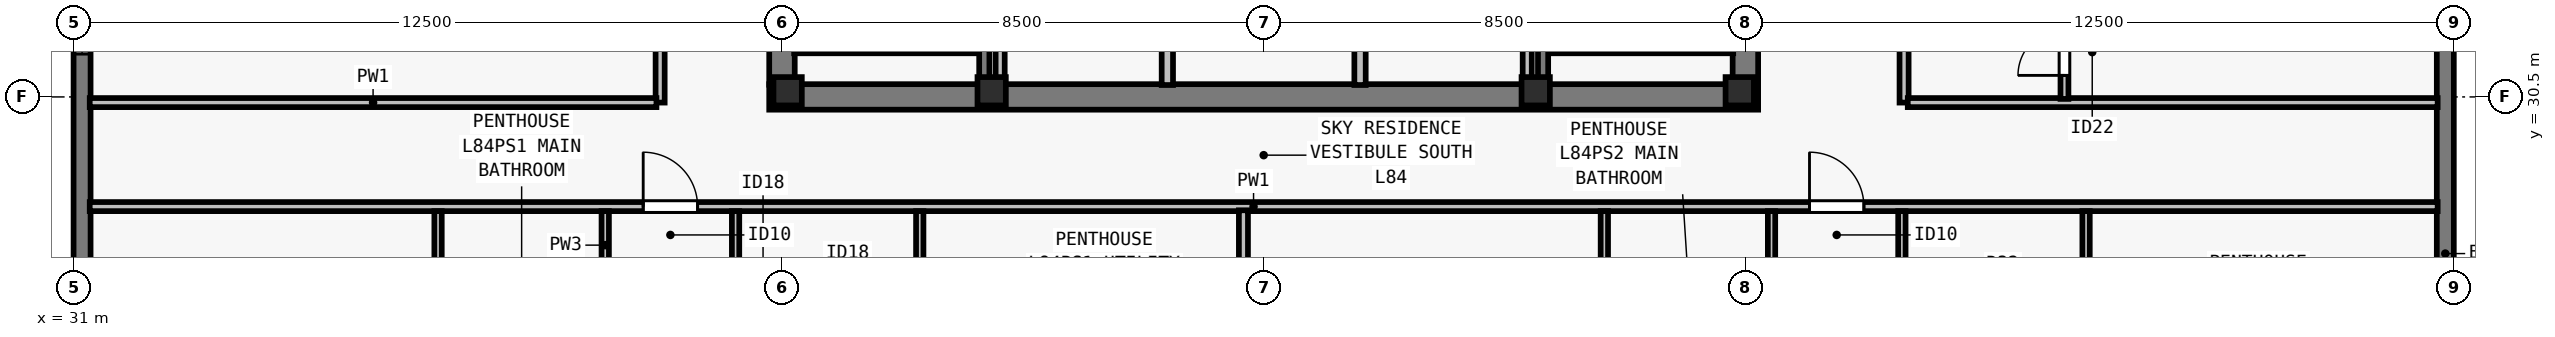
"""IFC4 building model, lengths in metres.
Left out: names, types, materials, properties, quantities, classifications, styles, units other than length and angle.
Written with IfcOpenShell. Run it as: python <this file> out.ifc"""

import sys

from ifc_helpers import new_model, si_unit, direction, frame, frame_2d, origin, origin_2d, place, context, subcontext, project, spatial, rectangle, i_section, extrude, element, fill, save


model = new_model("IFC4")
c1 = context("Model", 3, precision=1e-05, world=origin(), true_north=direction((0.0, 1.0)))
c2 = subcontext(c1, "Body", "Model", "MODEL_VIEW")
j1 = project(units=[si_unit("LENGTHUNIT", "METRE"), si_unit("PLANEANGLEUNIT", "RADIAN")], contexts=[c1])
p1 = place(None, origin())
s1 = spatial("IfcSite", under=j1, at=p1, CompositionType="ELEMENT")
p2 = place(p1, origin())
s2 = spatial("IfcBuilding", under=s1, at=p2, CompositionType="ELEMENT")
p3 = place(p2, frame((0.0, 0.0, 305.0)))
s3 = spatial("IfcBuildingStorey", under=s2, at=p3, CompositionType="ELEMENT", Elevation=305.0)
for number, where, z_axis, x_axis in (
    (1, (43.6, 30.6, 0.0), (0.0, 0.0, 1.0), (1.0, 0.0, 0.0)),
    (2, (47.2, 30.6, 0.0), (0.0, 0.0, 1.0), (1.0, 0.0, 0.0)),
    (3, (56.8, 30.6, 0.0), (0.0, 0.0, 1.0), (1.0, 0.0, 0.0)),
    (4, (60.4, 30.6, 0.0), (0.0, 0.0, 1.0), (1.0, 0.0, 0.0)),
):
    element("IfcColumn", number, at=place(p3, frame(where, z_axis=z_axis, x_axis=x_axis)), inside=s3, PredefinedType="COLUMN", context=c2, shape_type="SweptSolid", body=[
        extrude(i_section(OverallWidth=0.5, OverallDepth=0.5, WebThickness=0.028, FlangeThickness=0.045, at=origin_2d()), origin(), (0.0, 0.0, 1.0), 3.5),
    ])
p4 = place(p3, frame((72.85, 35.6, 0.0), z_axis=(0.0, 0.0, 1.0), x_axis=(0.0, -1.0, 0.0)))
e5 = element("IfcWall", 5, at=p4, inside=s3, PredefinedType="SOLIDWALL", context=c2, shape_type="SweptSolid", body=[
    extrude(rectangle(XDim=11.822, YDim=0.3, at=frame_2d((5.911, 0.0))), origin(), (0.0, 0.0, 1.0), 3.29),
])
p5 = place(p4, frame((2.105, 0.0, 0.8)))
e6 = element("IfcOpeningElement", 6, at=p5, cuts=e5, PredefinedType="OPENING", context=c2, shape_type="SweptSolid", body=[
    extrude(rectangle(XDim=1.65, YDim=1.758, at=frame_2d((0.825, 0.879))), frame((0.0, 0.16, 0.0), z_axis=(0.0, -1.0, 0.0), x_axis=(1.0, 0.0, 0.0)), (0.0, 0.0, 1.0), 0.32),
])
p6 = place(p3, frame((31.15, 23.5, 0.0), z_axis=(0.0, 0.0, 1.0), x_axis=(0.0, 1.0, 0.0)))
e7 = element("IfcWall", 7, at=p6, inside=s3, PredefinedType="SOLIDWALL", context=c2, shape_type="SweptSolid", body=[
    extrude(rectangle(XDim=30.722, YDim=0.3, at=frame_2d((15.361, 0.0))), origin(), (0.0, 0.0, 1.0), 3.29),
])
p7 = place(p6, frame((7.756, 0.0, 0.8)))
e8 = element("IfcOpeningElement", 8, at=p7, cuts=e7, PredefinedType="OPENING", context=c2, shape_type="SweptSolid", body=[
    extrude(rectangle(XDim=2.0, YDim=1.758, at=frame_2d((1.0, 0.879))), frame((0.0, 0.16, 0.0), z_axis=(0.0, -1.0, 0.0), x_axis=(1.0, 0.0, 0.0)), (0.0, 0.0, 1.0), 0.32),
])
p8 = place(p6, frame((12.617, 0.0, 0.8)))
e9 = element("IfcOpeningElement", 9, at=p8, cuts=e7, PredefinedType="OPENING", context=c2, shape_type="SweptSolid", body=[
    extrude(rectangle(XDim=1.65, YDim=1.758, at=frame_2d((0.825, 0.879))), frame((0.0, 0.16, 0.0), z_axis=(0.0, -1.0, 0.0), x_axis=(1.0, 0.0, 0.0)), (0.0, 0.0, 1.0), 0.32),
])
p9 = place(p6, frame((16.28, 0.0, 0.8)))
e10 = element("IfcOpeningElement", 10, at=p9, cuts=e7, PredefinedType="OPENING", context=c2, shape_type="SweptSolid", body=[
    extrude(rectangle(XDim=2.0, YDim=1.758, at=frame_2d((1.0, 0.879))), frame((0.0, 0.16, 0.0), z_axis=(0.0, -1.0, 0.0), x_axis=(1.0, 0.0, 0.0)), (0.0, 0.0, 1.0), 0.32),
])
p10 = place(p6, frame((21.142, 0.0, 0.8)))
e11 = element("IfcOpeningElement", 11, at=p10, cuts=e7, PredefinedType="OPENING", context=c2, shape_type="SweptSolid", body=[
    extrude(rectangle(XDim=1.65, YDim=1.758, at=frame_2d((0.825, 0.879))), frame((0.0, 0.16, 0.0), z_axis=(0.0, -1.0, 0.0), x_axis=(1.0, 0.0, 0.0)), (0.0, 0.0, 1.0), 0.32),
])
p11 = place(p3, frame((43.275, 30.5, 0.0), z_axis=(0.0, 0.0, 1.0), x_axis=(1.0, 0.0, 0.0)))
e12 = element("IfcWall", 12, at=p11, inside=s3, PredefinedType="SHEAR", context=c2, shape_type="SweptSolid", body=[
    extrude(rectangle(XDim=17.45, YDim=0.45, at=frame_2d((8.725, 0.0))), origin(), (0.0, 0.0, 1.0), 3.29),
])
for number, where, z_axis, x_axis in (
    (13, (43.5, 30.715, 0.0), (0.0, 0.0, 1.0), (0.0, 1.0, 0.0)),
    (14, (60.5, 30.715, 0.0), (0.0, 0.0, 1.0), (0.0, 1.0, 0.0)),
):
    element("IfcWall", number, at=place(p3, frame(where, z_axis=z_axis, x_axis=x_axis)), inside=s3, PredefinedType="SHEAR", context=c2, shape_type="SweptSolid", body=[
        extrude(rectangle(XDim=8.035, YDim=0.45, at=frame_2d((4.018, 0.0))), origin(), (0.0, 0.0, 1.0), 3.29),
    ])
p12 = place(p3, frame((50.3, 30.71, 0.0), z_axis=(0.0, 0.0, 1.0), x_axis=(0.0, 1.0, 0.0)))
e15 = element("IfcWall", 15, at=p12, inside=s3, PredefinedType="SOLIDWALL", context=c2, shape_type="SweptSolid", body=[
    extrude(rectangle(XDim=7.905, YDim=0.2, at=frame_2d((3.953, 0.0))), origin(), (0.0, 0.0, 1.0), 3.29),
])
p13 = place(p12, frame((3.34, 0.0, 0.0)))
e16 = element("IfcOpeningElement", 16, at=p13, cuts=e15, PredefinedType="OPENING", context=c2, shape_type="SweptSolid", body=[
    extrude(rectangle(XDim=0.9, YDim=2.12, at=frame_2d((0.45, 1.06))), frame((0.0, 0.11, 0.0), z_axis=(0.0, -1.0, 0.0), x_axis=(1.0, 0.0, 0.0)), (0.0, 0.0, 1.0), 0.22),
])
p14 = place(p3, frame((53.7, 30.71, 0.0), z_axis=(0.0, 0.0, 1.0), x_axis=(0.0, 1.0, 0.0)))
e17 = element("IfcWall", 17, at=p14, inside=s3, PredefinedType="SOLIDWALL", context=c2, shape_type="SweptSolid", body=[
    extrude(rectangle(XDim=7.905, YDim=0.2, at=frame_2d((3.953, 0.0))), origin(), (0.0, 0.0, 1.0), 3.29),
])
p15 = place(p14, frame((1.39, 0.0, 0.0)))
e18 = element("IfcOpeningElement", 18, at=p15, cuts=e17, PredefinedType="OPENING", context=c2, shape_type="SweptSolid", body=[
    extrude(rectangle(XDim=0.95, YDim=2.12, at=frame_2d((0.475, 1.06))), frame((0.0, 0.11, 0.0), z_axis=(0.0, -1.0, 0.0), x_axis=(1.0, 0.0, 0.0)), (0.0, 0.0, 1.0), 0.22),
])
p16 = place(p14, frame((5.39, 0.0, 0.0)))
e19 = element("IfcOpeningElement", 19, at=p16, cuts=e17, PredefinedType="OPENING", context=c2, shape_type="SweptSolid", body=[
    extrude(rectangle(XDim=0.85, YDim=2.12, at=frame_2d((0.425, 1.06))), frame((0.0, 0.11, 0.0), z_axis=(0.0, -1.0, 0.0), x_axis=(1.0, 0.0, 0.0)), (0.0, 0.0, 1.0), 0.22),
])
for number, where, z_axis, x_axis in (
    (20, (47.35, 30.71, 0.0), (0.0, 0.0, 1.0), (0.0, 1.0, 0.0)),
    (21, (56.65, 30.71, 0.0), (0.0, 0.0, 1.0), (0.0, 1.0, 0.0)),
):
    element("IfcWall", number, at=place(p3, frame(where, z_axis=z_axis, x_axis=x_axis)), inside=s3, PredefinedType="PARTITIONING", context=c2, shape_type="SweptSolid", body=[
        extrude(rectangle(XDim=7.905, YDim=0.16, at=frame_2d((3.953, 0.0))), origin(), (0.0, 0.0, 1.0), 3.29),
    ])
p17 = place(p3, frame((31.285, 28.565, 0.0), z_axis=(0.0, 0.0, 1.0), x_axis=(1.0, 0.0, 0.0)))
e22 = element("IfcWall", 22, at=p17, inside=s3, PredefinedType="PARTITIONING", context=c2, shape_type="SweptSolid", body=[
    extrude(rectangle(XDim=41.43, YDim=0.16, at=frame_2d((20.715, 0.0))), origin(), (0.0, 0.0, 1.0), 3.009),
])
p18 = place(p17, frame((9.766, 0.0, 0.0)))
e23 = element("IfcOpeningElement", 23, at=p18, cuts=e22, PredefinedType="OPENING", context=c2, shape_type="SweptSolid", body=[
    extrude(rectangle(XDim=0.96, YDim=2.18, at=frame_2d((0.48, 1.09))), frame((0.0, 0.09, 0.0), z_axis=(0.0, -1.0, 0.0), x_axis=(1.0, 0.0, 0.0)), (0.0, 0.0, 1.0), 0.18),
])
p19 = place(p17, frame((30.346, 0.0, 0.0)))
e24 = element("IfcOpeningElement", 24, at=p19, cuts=e22, PredefinedType="OPENING", context=c2, shape_type="SweptSolid", body=[
    extrude(rectangle(XDim=0.96, YDim=2.18, at=frame_2d((0.48, 1.09))), frame((0.0, 0.09, 0.0), z_axis=(0.0, -1.0, 0.0), x_axis=(1.0, 0.0, 0.0)), (0.0, 0.0, 1.0), 0.18),
])
p20 = place(p3, frame((41.35, 30.4, 0.0), z_axis=(0.0, 0.0, 1.0), x_axis=(0.0, 1.0, 0.0)))
e25 = element("IfcWall", 25, at=p20, inside=s3, PredefinedType="PARTITIONING", context=c2, shape_type="SweptSolid", body=[
    extrude(rectangle(XDim=17.2, YDim=0.16, at=frame_2d((8.6, 0.0))), origin(), (0.0, 0.0, 1.0), 3.009),
])
p21 = place(p20, frame((8.0, 0.0, 0.0)))
e26 = element("IfcOpeningElement", 26, at=p21, cuts=e25, PredefinedType="OPENING", context=c2, shape_type="SweptSolid", body=[
    extrude(rectangle(XDim=0.96, YDim=2.12, at=frame_2d((0.48, 1.06))), frame((0.0, 0.09, 0.0), z_axis=(0.0, -1.0, 0.0), x_axis=(1.0, 0.0, 0.0)), (0.0, 0.0, 1.0), 0.18),
])
p22 = place(p3, frame((63.3, 30.4, 0.0), z_axis=(0.0, 0.0, 1.0), x_axis=(0.0, 1.0, 0.0)))
e27 = element("IfcWall", 27, at=p22, inside=s3, PredefinedType="PARTITIONING", context=c2, shape_type="SweptSolid", body=[
    extrude(rectangle(XDim=17.2, YDim=0.16, at=frame_2d((8.6, 0.0))), origin(), (0.0, 0.0, 1.0), 3.29),
])
p23 = place(p22, frame((8.12, 0.0, 0.0)))
e28 = element("IfcOpeningElement", 28, at=p23, cuts=e27, PredefinedType="OPENING", context=c2, shape_type="SweptSolid", body=[
    extrude(rectangle(XDim=0.96, YDim=2.18, at=frame_2d((0.48, 1.09))), frame((0.0, 0.09, 0.0), z_axis=(0.0, -1.0, 0.0), x_axis=(1.0, 0.0, 0.0)), (0.0, 0.0, 1.0), 0.18),
])
p24 = place(p3, frame((31.285, 30.4, 0.0), z_axis=(0.0, 0.0, 1.0), x_axis=(1.0, 0.0, 0.0)))
e29 = element("IfcWall", 29, at=p24, inside=s3, PredefinedType="PARTITIONING", context=c2, shape_type="SweptSolid", body=[
    extrude(rectangle(XDim=10.0, YDim=0.16, at=frame_2d((5.0, 0.0))), origin(), (0.0, 0.0, 1.0), 3.29),
])
p25 = place(p3, frame((63.365, 30.4, 0.0), z_axis=(0.0, 0.0, 1.0), x_axis=(1.0, 0.0, 0.0)))
e30 = element("IfcWall", 30, at=p25, inside=s3, PredefinedType="PARTITIONING", context=c2, shape_type="SweptSolid", body=[
    extrude(rectangle(XDim=9.35, YDim=0.16, at=frame_2d((4.675, 0.0))), origin(), (0.0, 0.0, 1.0), 3.29),
])
p26 = place(p3, frame((37.431, 25.735, 0.0), z_axis=(0.0, 0.0, 1.0), x_axis=(0.0, 1.0, 0.0)))
e31 = element("IfcWall", 31, at=p26, inside=s3, PredefinedType="PLUMBINGWALL", context=c2, shape_type="SweptSolid", body=[
    extrude(rectangle(XDim=2.75, YDim=0.13, at=frame_2d((1.375, 0.0))), origin(), (0.0, 0.0, 1.0), 3.29),
])
p27 = place(p3, frame((40.381, 25.735, 0.0), z_axis=(0.0, 0.0, 1.0), x_axis=(0.0, 1.0, 0.0)))
e32 = element("IfcWall", 32, at=p27, inside=s3, PredefinedType="PLUMBINGWALL", context=c2, shape_type="SweptSolid", body=[
    extrude(rectangle(XDim=2.75, YDim=0.13, at=frame_2d((1.375, 0.0))), origin(), (0.0, 0.0, 1.0), 3.29),
])
p28 = place(p27, frame((0.55, 0.0, 0.0)))
e33 = element("IfcOpeningElement", 33, at=p28, cuts=e32, PredefinedType="OPENING", context=c2, shape_type="SweptSolid", body=[
    extrude(rectangle(XDim=0.85, YDim=2.08, at=frame_2d((0.425, 1.04))), frame((0.0, 0.075, 0.0), z_axis=(0.0, -1.0, 0.0), x_axis=(1.0, 0.0, 0.0)), (0.0, 0.0, 1.0), 0.15),
])
p29 = place(p3, frame((45.931, 25.735, 0.0), z_axis=(0.0, 0.0, 1.0), x_axis=(0.0, 1.0, 0.0)))
e34 = element("IfcWall", 34, at=p29, inside=s3, PredefinedType="PLUMBINGWALL", context=c2, shape_type="SweptSolid", body=[
    extrude(rectangle(XDim=2.75, YDim=0.13, at=frame_2d((1.375, 0.0))), origin(), (0.0, 0.0, 1.0), 3.29),
])
p30 = place(p3, frame((42.681, 25.735, 0.0), z_axis=(0.0, 0.0, 1.0), x_axis=(0.0, 1.0, 0.0)))
e35 = element("IfcWall", 35, at=p30, inside=s3, PredefinedType="PLUMBINGWALL", context=c2, shape_type="SweptSolid", body=[
    extrude(rectangle(XDim=2.75, YDim=0.13, at=frame_2d((1.375, 0.0))), origin(), (0.0, 0.0, 1.0), 3.29),
])
p31 = place(p30, frame((0.55, 0.0, 0.0)))
e36 = element("IfcOpeningElement", 36, at=p31, cuts=e35, PredefinedType="OPENING", context=c2, shape_type="SweptSolid", body=[
    extrude(rectangle(XDim=0.88, YDim=2.1, at=frame_2d((0.44, 1.05))), frame((0.0, 0.075, 0.0), z_axis=(0.0, -1.0, 0.0), x_axis=(1.0, 0.0, 0.0)), (0.0, 0.0, 1.0), 0.15),
])
p32 = place(p3, frame((51.643, 18.285, 0.0), z_axis=(0.0, 0.0, 1.0), x_axis=(0.0, 1.0, 0.0)))
e37 = element("IfcWall", 37, at=p32, inside=s3, PredefinedType="PARTITIONING", context=c2, shape_type="SweptSolid", body=[
    extrude(rectangle(XDim=10.215, YDim=0.16, at=frame_2d((5.107, 0.0))), origin(), (0.0, 0.0, 1.0), 3.009),
])
p33 = place(p3, frame((58.011, 25.735, 0.0), z_axis=(0.0, 0.0, 1.0), x_axis=(0.0, 1.0, 0.0)))
e38 = element("IfcWall", 38, at=p33, inside=s3, PredefinedType="PLUMBINGWALL", context=c2, shape_type="SweptSolid", body=[
    extrude(rectangle(XDim=2.75, YDim=0.13, at=frame_2d((1.375, 0.0))), origin(), (0.0, 0.0, 1.0), 3.29),
])
p34 = place(p3, frame((60.961, 25.735, 0.0), z_axis=(0.0, 0.0, 1.0), x_axis=(0.0, 1.0, 0.0)))
e39 = element("IfcWall", 39, at=p34, inside=s3, PredefinedType="PLUMBINGWALL", context=c2, shape_type="SweptSolid", body=[
    extrude(rectangle(XDim=2.75, YDim=0.13, at=frame_2d((1.375, 0.0))), origin(), (0.0, 0.0, 1.0), 3.29),
])
p35 = place(p34, frame((0.55, 0.0, 0.0)))
e40 = element("IfcOpeningElement", 40, at=p35, cuts=e39, PredefinedType="OPENING", context=c2, shape_type="SweptSolid", body=[
    extrude(rectangle(XDim=0.85, YDim=2.08, at=frame_2d((0.425, 1.04))), frame((0.0, 0.075, 0.0), z_axis=(0.0, -1.0, 0.0), x_axis=(1.0, 0.0, 0.0)), (0.0, 0.0, 1.0), 0.15),
])
p36 = place(p3, frame((66.511, 25.735, 0.0), z_axis=(0.0, 0.0, 1.0), x_axis=(0.0, 1.0, 0.0)))
e41 = element("IfcWall", 41, at=p36, inside=s3, PredefinedType="PLUMBINGWALL", context=c2, shape_type="SweptSolid", body=[
    extrude(rectangle(XDim=2.75, YDim=0.13, at=frame_2d((1.375, 0.0))), origin(), (0.0, 0.0, 1.0), 3.29),
])
p37 = place(p3, frame((63.261, 25.735, 0.0), z_axis=(0.0, 0.0, 1.0), x_axis=(0.0, 1.0, 0.0)))
e42 = element("IfcWall", 42, at=p37, inside=s3, PredefinedType="PLUMBINGWALL", context=c2, shape_type="SweptSolid", body=[
    extrude(rectangle(XDim=2.75, YDim=0.13, at=frame_2d((1.375, 0.0))), origin(), (0.0, 0.0, 1.0), 3.29),
])
p38 = place(p37, frame((0.55, 0.0, 0.0)))
e43 = element("IfcOpeningElement", 43, at=p38, cuts=e42, PredefinedType="OPENING", context=c2, shape_type="SweptSolid", body=[
    extrude(rectangle(XDim=0.88, YDim=2.1, at=frame_2d((0.44, 1.05))), frame((0.0, 0.075, 0.0), z_axis=(0.0, -1.0, 0.0), x_axis=(1.0, 0.0, 0.0)), (0.0, 0.0, 1.0), 0.15),
])
p39 = place(p3, frame((66.13, 30.465, 0.0), z_axis=(0.0, 0.0, 1.0), x_axis=(0.0, 1.0, 0.0)))
e44 = element("IfcWall", 44, at=p39, inside=s3, PredefinedType="PARTITIONING", context=c2, shape_type="SweptSolid", body=[
    extrude(rectangle(XDim=4.16, YDim=0.14, at=frame_2d((2.08, 0.0))), origin(), (0.0, 0.0, 1.0), 3.29),
])
p40 = place(p39, frame((0.415, 0.0, 0.0)))
e45 = element("IfcOpeningElement", 45, at=p40, cuts=e44, PredefinedType="OPENING", context=c2, shape_type="SweptSolid", body=[
    extrude(rectangle(XDim=0.82, YDim=2.1, at=frame_2d((0.41, 1.05))), frame((0.0, 0.08, 0.0), z_axis=(0.0, -1.0, 0.0), x_axis=(1.0, 0.0, 0.0)), (0.0, 0.0, 1.0), 0.16),
])
p41 = place(p3, frame((43.715, 31.36, 0.0), z_axis=(0.0, 0.0, 1.0), x_axis=(1.0, 0.0, 0.0)))
e46 = element("IfcWall", 46, at=p41, inside=s3, PredefinedType="SOLIDWALL", context=c2, shape_type="SweptSolid", body=[
    extrude(rectangle(XDim=3.28, YDim=0.18, at=frame_2d((1.64, 0.0))), origin(), (0.0, 0.0, 1.0), 3.29),
])
p42 = place(p3, frame((47.07, 38.78, 0.0), z_axis=(0.0, 0.0, 1.0), x_axis=(0.0, -1.0, 0.0)))
e47 = element("IfcWall", 47, at=p42, inside=s3, PredefinedType="SOLIDWALL", context=c2, shape_type="SweptSolid", body=[
    extrude(rectangle(XDim=8.067, YDim=0.18, at=frame_2d((4.034, 0.0))), origin(), (0.0, 0.0, 1.0), 3.29),
])
p43 = place(p3, frame((57.005, 31.36, 0.0), z_axis=(0.0, 0.0, 1.0), x_axis=(1.0, 0.0, 0.0)))
e48 = element("IfcWall", 48, at=p43, inside=s3, PredefinedType="SOLIDWALL", context=c2, shape_type="SweptSolid", body=[
    extrude(rectangle(XDim=3.28, YDim=0.18, at=frame_2d((1.64, 0.0))), origin(), (0.0, 0.0, 1.0), 3.29),
])
p44 = place(p3, frame((56.93, 38.78, 0.0), z_axis=(0.0, 0.0, 1.0), x_axis=(0.0, -1.0, 0.0)))
e49 = element("IfcWall", 49, at=p44, inside=s3, PredefinedType="SOLIDWALL", context=c2, shape_type="SweptSolid", body=[
    extrude(rectangle(XDim=8.067, YDim=0.18, at=frame_2d((4.034, 0.0))), origin(), (0.0, 0.0, 1.0), 3.29),
])
p45 = place(p7, origin())
e50 = element("IfcWindow", 50, at=p45, inside=s3, PartitioningType="SINGLE_PANEL", PredefinedType="WINDOW", context=c2, shape_type="SweptSolid", body=[
    extrude(rectangle(XDim=2.0, YDim=1.758, at=frame_2d((1.0, 0.879))), frame((0.0, -0.05, 0.0), z_axis=(0.0, -1.0, 0.0), x_axis=(1.0, 0.0, 0.0)), (0.0, 0.0, 1.0), 0.06),
])
fill(e8, e50)
p46 = place(p18, origin())
e51 = element("IfcDoor", 51, at=p46, inside=s3, OperationType="SINGLE_SWING_LEFT", PredefinedType="DOOR", context=c2, shape_type="SweptSolid", body=[
    extrude(rectangle(XDim=0.96, YDim=2.18, at=frame_2d((0.48, 1.09))), frame((0.0, 0.025, 0.0), z_axis=(0.0, -1.0, 0.0), x_axis=(1.0, 0.0, 0.0)), (0.0, 0.0, 1.0), 0.05),
])
fill(e23, e51)
p47 = place(p19, origin())
e52 = element("IfcDoor", 52, at=p47, inside=s3, OperationType="SINGLE_SWING_LEFT", PredefinedType="DOOR", context=c2, shape_type="SweptSolid", body=[
    extrude(rectangle(XDim=0.96, YDim=2.18, at=frame_2d((0.48, 1.09))), frame((0.0, 0.025, 0.0), z_axis=(0.0, -1.0, 0.0), x_axis=(1.0, 0.0, 0.0)), (0.0, 0.0, 1.0), 0.05),
])
fill(e24, e52)
p48 = place(p40, origin())
e53 = element("IfcDoor", 53, at=p48, inside=s3, OperationType="SINGLE_SWING_LEFT", PredefinedType="DOOR", context=c2, shape_type="SweptSolid", body=[
    extrude(rectangle(XDim=0.82, YDim=2.1, at=frame_2d((0.41, 1.05))), frame((0.0, 0.025, 0.0), z_axis=(0.0, -1.0, 0.0), x_axis=(1.0, 0.0, 0.0)), (0.0, 0.0, 1.0), 0.05),
])
fill(e45, e53)
save(model, sys.argv[1])
